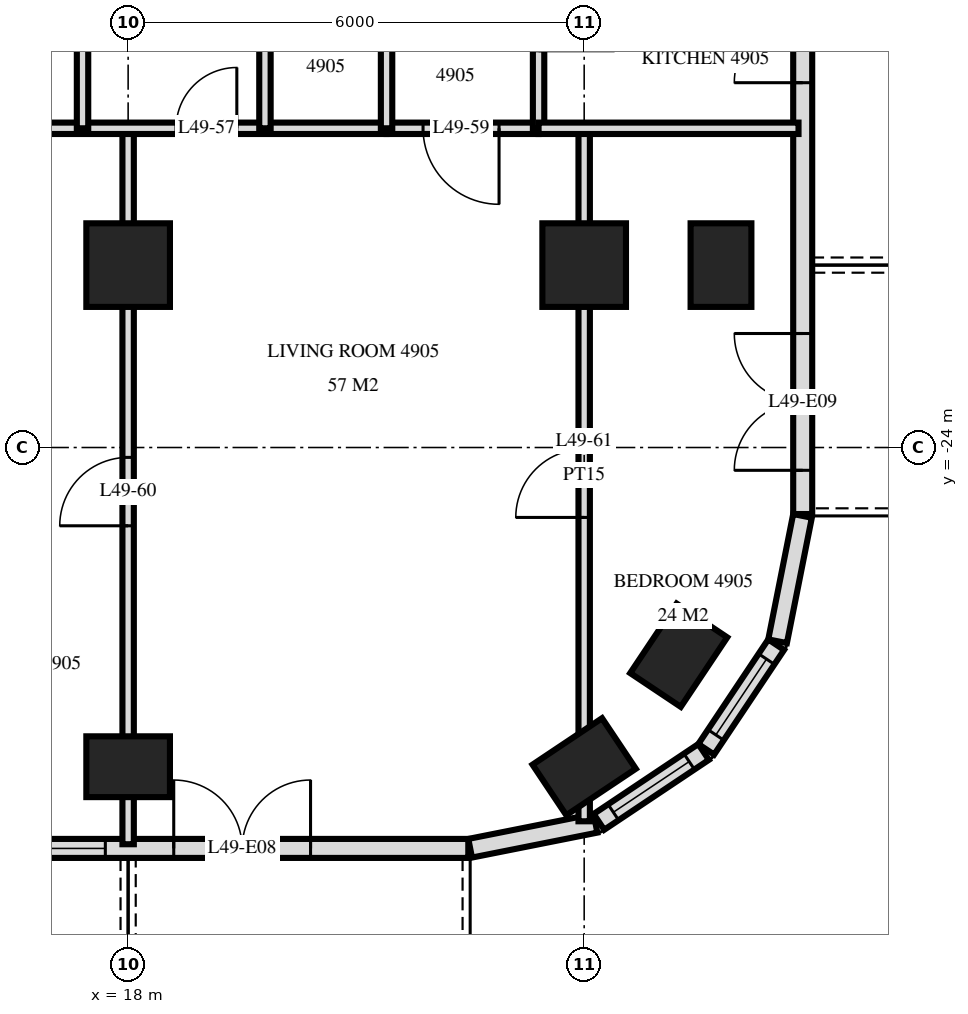
"""IFC4 building model, lengths in metres.
Left out: names, types, materials, properties, quantities, classifications, styles, units other than length and angle.
Written with IfcOpenShell. Run it as: python <this file> out.ifc"""

import sys

from ifc_helpers import new_model, si_unit, direction, frame, frame_2d, origin, origin_2d, place, context, subcontext, project, spatial, rectangle, extrude, element, fill, save


model = new_model("IFC4")
c1 = context("Model", 3, precision=1e-05, world=origin(), true_north=direction((0.0, 1.0)))
c2 = subcontext(c1, "Body", "Model", "MODEL_VIEW")
j1 = project(units=[si_unit("LENGTHUNIT", "METRE"), si_unit("PLANEANGLEUNIT", "RADIAN")], contexts=[c1])
p1 = place(None, origin())
s1 = spatial("IfcSite", under=j1, at=p1, CompositionType="ELEMENT")
p2 = place(p1, origin())
s2 = spatial("IfcBuilding", under=s1, at=p2, CompositionType="ELEMENT")
p3 = place(p2, frame((0.0, 0.0, 190.6)))
s3 = spatial("IfcBuildingStorey", under=s2, at=p3, CompositionType="ELEMENT", Elevation=190.6)
p4 = place(p3, frame((18.0, -28.2, 0.0), z_axis=(0.0, 0.0, 1.0), x_axis=(1.0, 0.0, 0.0)))
e1 = element("IfcColumn", 1, at=p4, inside=s3, PredefinedType="COLUMN", context=c2, shape_type="SweptSolid", body=[
    extrude(rectangle(XDim=1.1, YDim=0.8, at=origin_2d()), origin(), (0.0, 0.0, 1.0), 3.5),
])
p5 = place(p3, frame((18.0, -21.6, 0.0), z_axis=(0.0, 0.0, 1.0), x_axis=(1.0, 0.0, 0.0)))
e2 = element("IfcColumn", 2, at=p5, inside=s3, PredefinedType="COLUMN", context=c2, shape_type="SweptSolid", body=[
    extrude(rectangle(XDim=1.1, YDim=1.1, at=origin_2d()), origin(), (0.0, 0.0, 1.0), 3.5),
])
p6 = place(p3, frame((24.0, -28.2, 0.0), z_axis=(0.0, 0.0, 1.0), x_axis=(0.831459915646, 0.555584744817, 0.0)))
e3 = element("IfcColumn", 3, at=p6, inside=s3, PredefinedType="COLUMN", context=c2, shape_type="SweptSolid", body=[
    extrude(rectangle(XDim=1.1, YDim=0.8, at=origin_2d()), origin(), (0.0, 0.0, 1.0), 3.5),
])
p7 = place(p3, frame((24.0, -21.6, 0.0), z_axis=(0.0, 0.0, 1.0), x_axis=(1.0, 0.0, 0.0)))
e4 = element("IfcColumn", 4, at=p7, inside=s3, PredefinedType="COLUMN", context=c2, shape_type="SweptSolid", body=[
    extrude(rectangle(XDim=1.1, YDim=1.1, at=origin_2d()), origin(), (0.0, 0.0, 1.0), 3.5),
])
for number, where, z_axis, x_axis in (
    (5, (25.244, -26.733, 0.0), (0.0, 0.0, 1.0), (0.556, 0.831, 0.0)),
    (6, (25.8, -21.6, 0.0), (0.0, 0.0, 1.0), (0.0, 1.0, 0.0)),
):
    element("IfcColumn", number, at=place(p3, frame(where, z_axis=z_axis, x_axis=x_axis)), inside=s3, PredefinedType="COLUMN", context=c2, shape_type="SweptSolid", body=[
        extrude(rectangle(XDim=1.1, YDim=0.8, at=origin_2d()), origin(), (0.0, 0.0, 1.0), 3.5),
    ])
p8 = place(p3, frame((-22.475, -29.275, 0.0), z_axis=(0.0, 0.0, 1.0), x_axis=(1.0, 0.0, 0.0)))
e7 = element("IfcWall", 7, at=p8, inside=s3, PredefinedType="SOLIDWALL", context=c2, shape_type="SweptSolid", body=[
    extrude(rectangle(XDim=44.951, YDim=0.25, at=frame_2d((22.475, 0.0))), origin(), (0.0, 0.0, 1.0), 3.22),
])
p9 = place(p8, frame((0.575, 0.0, 0.0)))
e8 = element("IfcOpeningElement", 8, at=p9, cuts=e7, PredefinedType="OPENING", context=c2, shape_type="SweptSolid", body=[
    extrude(rectangle(XDim=1.8, YDim=2.4, at=frame_2d((0.9, 1.2))), frame((0.0, 0.135, 0.0), z_axis=(0.0, -1.0, 0.0), x_axis=(1.0, 0.0, 0.0)), (0.0, 0.0, 1.0), 0.27),
])
p10 = place(p8, frame((4.775, 0.0, 0.9)))
e9 = element("IfcOpeningElement", 9, at=p10, cuts=e7, PredefinedType="OPENING", context=c2, shape_type="SweptSolid", body=[
    extrude(rectangle(XDim=2.4, YDim=1.5, at=frame_2d((1.2, 0.75))), frame((0.0, 0.135, 0.0), z_axis=(0.0, -1.0, 0.0), x_axis=(1.0, 0.0, 0.0)), (0.0, 0.0, 1.0), 0.27),
])
p11 = place(p8, frame((8.075, 0.0, 0.0)))
e10 = element("IfcOpeningElement", 10, at=p11, cuts=e7, PredefinedType="OPENING", context=c2, shape_type="SweptSolid", body=[
    extrude(rectangle(XDim=1.8, YDim=2.4, at=frame_2d((0.9, 1.2))), frame((0.0, 0.135, 0.0), z_axis=(0.0, -1.0, 0.0), x_axis=(1.0, 0.0, 0.0)), (0.0, 0.0, 1.0), 0.27),
])
p12 = place(p8, frame((11.075, 0.0, 0.0)))
e11 = element("IfcOpeningElement", 11, at=p12, cuts=e7, PredefinedType="OPENING", context=c2, shape_type="SweptSolid", body=[
    extrude(rectangle(XDim=1.8, YDim=2.4, at=frame_2d((0.9, 1.2))), frame((0.0, 0.135, 0.0), z_axis=(0.0, -1.0, 0.0), x_axis=(1.0, 0.0, 0.0)), (0.0, 0.0, 1.0), 0.27),
])
p13 = place(p8, frame((13.775, 0.0, 0.9)))
e12 = element("IfcOpeningElement", 12, at=p13, cuts=e7, PredefinedType="OPENING", context=c2, shape_type="SweptSolid", body=[
    extrude(rectangle(XDim=2.4, YDim=1.5, at=frame_2d((1.2, 0.75))), frame((0.0, 0.135, 0.0), z_axis=(0.0, -1.0, 0.0), x_axis=(1.0, 0.0, 0.0)), (0.0, 0.0, 1.0), 0.27),
])
p14 = place(p8, frame((20.075, 0.0, 0.0)))
e13 = element("IfcOpeningElement", 13, at=p14, cuts=e7, PredefinedType="OPENING", context=c2, shape_type="SweptSolid", body=[
    extrude(rectangle(XDim=1.8, YDim=2.4, at=frame_2d((0.9, 1.2))), frame((0.0, 0.135, 0.0), z_axis=(0.0, -1.0, 0.0), x_axis=(1.0, 0.0, 0.0)), (0.0, 0.0, 1.0), 0.27),
])
p15 = place(p8, frame((23.075, 0.0, 0.0)))
e14 = element("IfcOpeningElement", 14, at=p15, cuts=e7, PredefinedType="OPENING", context=c2, shape_type="SweptSolid", body=[
    extrude(rectangle(XDim=1.8, YDim=2.4, at=frame_2d((0.9, 1.2))), frame((0.0, 0.135, 0.0), z_axis=(0.0, -1.0, 0.0), x_axis=(1.0, 0.0, 0.0)), (0.0, 0.0, 1.0), 0.27),
])
p16 = place(p8, frame((29.075, 0.0, 0.0)))
e15 = element("IfcOpeningElement", 15, at=p16, cuts=e7, PredefinedType="OPENING", context=c2, shape_type="SweptSolid", body=[
    extrude(rectangle(XDim=1.8, YDim=2.4, at=frame_2d((0.9, 1.2))), frame((0.0, 0.135, 0.0), z_axis=(0.0, -1.0, 0.0), x_axis=(1.0, 0.0, 0.0)), (0.0, 0.0, 1.0), 0.27),
])
p17 = place(p8, frame((31.775, 0.0, 0.9)))
e16 = element("IfcOpeningElement", 16, at=p17, cuts=e7, PredefinedType="OPENING", context=c2, shape_type="SweptSolid", body=[
    extrude(rectangle(XDim=2.4, YDim=1.5, at=frame_2d((1.2, 0.75))), frame((0.0, 0.135, 0.0), z_axis=(0.0, -1.0, 0.0), x_axis=(1.0, 0.0, 0.0)), (0.0, 0.0, 1.0), 0.27),
])
p18 = place(p8, frame((35.075, 0.0, 0.0)))
e17 = element("IfcOpeningElement", 17, at=p18, cuts=e7, PredefinedType="OPENING", context=c2, shape_type="SweptSolid", body=[
    extrude(rectangle(XDim=1.8, YDim=2.4, at=frame_2d((0.9, 1.2))), frame((0.0, 0.135, 0.0), z_axis=(0.0, -1.0, 0.0), x_axis=(1.0, 0.0, 0.0)), (0.0, 0.0, 1.0), 0.27),
])
p19 = place(p8, frame((37.775, 0.0, 0.9)))
e18 = element("IfcOpeningElement", 18, at=p19, cuts=e7, PredefinedType="OPENING", context=c2, shape_type="SweptSolid", body=[
    extrude(rectangle(XDim=2.4, YDim=1.5, at=frame_2d((1.2, 0.75))), frame((0.0, 0.135, 0.0), z_axis=(0.0, -1.0, 0.0), x_axis=(1.0, 0.0, 0.0)), (0.0, 0.0, 1.0), 0.27),
])
p20 = place(p8, frame((41.075, 0.0, 0.0)))
e19 = element("IfcOpeningElement", 19, at=p20, cuts=e7, PredefinedType="OPENING", context=c2, shape_type="SweptSolid", body=[
    extrude(rectangle(XDim=1.8, YDim=2.4, at=frame_2d((0.9, 1.2))), frame((0.0, 0.135, 0.0), z_axis=(0.0, -1.0, 0.0), x_axis=(1.0, 0.0, 0.0)), (0.0, 0.0, 1.0), 0.27),
])
p21 = place(p3, frame((22.5, -29.273, 0.0), z_axis=(0.0, 0.0, 1.0), x_axis=(0.980775640221, 0.19513878023, 0.0)))
e20 = element("IfcWall", 20, at=p21, inside=s3, PredefinedType="SOLIDWALL", context=c2, shape_type="SweptSolid", body=[
    extrude(rectangle(XDim=1.681, YDim=0.25, at=frame_2d((0.841, 0.0))), origin(), (0.0, 0.0, 1.0), 3.22),
])
p22 = place(p3, frame((24.194, -28.926, 0.0), z_axis=(0.0, 0.0, 1.0), x_axis=(0.831482937015, 0.55555029066, 0.0)))
e21 = element("IfcWall", 21, at=p22, inside=s3, PredefinedType="SOLIDWALL", context=c2, shape_type="SweptSolid", body=[
    extrude(rectangle(XDim=1.656, YDim=0.25, at=frame_2d((0.828, 0.0))), origin(), (0.0, 0.0, 1.0), 3.22),
])
p23 = place(p22, frame((0.228, 0.0, 0.9)))
e22 = element("IfcOpeningElement", 22, at=p23, cuts=e21, PredefinedType="OPENING", context=c2, shape_type="SweptSolid", body=[
    extrude(rectangle(XDim=1.2, YDim=1.5, at=frame_2d((0.6, 0.75))), frame((0.0, 0.135, 0.0), z_axis=(0.0, -1.0, 0.0), x_axis=(1.0, 0.0, 0.0)), (0.0, 0.0, 1.0), 0.27),
])
p24 = place(p3, frame((25.606, -27.971, 0.0), z_axis=(0.0, 0.0, 1.0), x_axis=(0.55555029066, 0.831482937015, 0.0)))
e23 = element("IfcWall", 23, at=p24, inside=s3, PredefinedType="SOLIDWALL", context=c2, shape_type="SweptSolid", body=[
    extrude(rectangle(XDim=1.656, YDim=0.25, at=frame_2d((0.828, 0.0))), origin(), (0.0, 0.0, 1.0), 3.22),
])
p25 = place(p24, frame((0.228, 0.0, 0.9)))
e24 = element("IfcOpeningElement", 24, at=p25, cuts=e23, PredefinedType="OPENING", context=c2, shape_type="SweptSolid", body=[
    extrude(rectangle(XDim=1.2, YDim=1.5, at=frame_2d((0.6, 0.75))), frame((0.0, 0.135, 0.0), z_axis=(0.0, -1.0, 0.0), x_axis=(1.0, 0.0, 0.0)), (0.0, 0.0, 1.0), 0.27),
])
p26 = place(p3, frame((26.545, -26.549, 0.0), z_axis=(0.0, 0.0, 1.0), x_axis=(0.195026884138, 0.980797896849, 0.0)))
e25 = element("IfcWall", 25, at=p26, inside=s3, PredefinedType="SOLIDWALL", context=c2, shape_type="SweptSolid", body=[
    extrude(rectangle(XDim=1.681, YDim=0.25, at=frame_2d((0.841, 0.0))), origin(), (0.0, 0.0, 1.0), 3.22),
])
p27 = place(p3, frame((26.875, -24.875, 0.0), z_axis=(0.0, 0.0, 1.0), x_axis=(0.0, 1.0, 0.0)))
e26 = element("IfcWall", 26, at=p27, inside=s3, PredefinedType="SOLIDWALL", context=c2, shape_type="SweptSolid", body=[
    extrude(rectangle(XDim=21.551, YDim=0.25, at=frame_2d((10.775, 0.0))), origin(), (0.0, 0.0, 1.0), 3.22),
])
p28 = place(p27, frame((0.575, 0.0, 0.0)))
e27 = element("IfcOpeningElement", 27, at=p28, cuts=e26, PredefinedType="OPENING", context=c2, shape_type="SweptSolid", body=[
    extrude(rectangle(XDim=1.8, YDim=2.4, at=frame_2d((0.9, 1.2))), frame((0.0, 0.135, 0.0), z_axis=(0.0, -1.0, 0.0), x_axis=(1.0, 0.0, 0.0)), (0.0, 0.0, 1.0), 0.27),
])
p29 = place(p27, frame((5.675, 0.0, 0.0)))
e28 = element("IfcOpeningElement", 28, at=p29, cuts=e26, PredefinedType="OPENING", context=c2, shape_type="SweptSolid", body=[
    extrude(rectangle(XDim=1.8, YDim=2.4, at=frame_2d((0.9, 1.2))), frame((0.0, 0.135, 0.0), z_axis=(0.0, -1.0, 0.0), x_axis=(1.0, 0.0, 0.0)), (0.0, 0.0, 1.0), 0.27),
])
p30 = place(p27, frame((10.175, 0.0, 0.9)))
e29 = element("IfcOpeningElement", 29, at=p30, cuts=e26, PredefinedType="OPENING", context=c2, shape_type="SweptSolid", body=[
    extrude(rectangle(XDim=2.4, YDim=1.5, at=frame_2d((1.2, 0.75))), frame((0.0, 0.135, 0.0), z_axis=(0.0, -1.0, 0.0), x_axis=(1.0, 0.0, 0.0)), (0.0, 0.0, 1.0), 0.27),
])
p31 = place(p27, frame((13.475, 0.0, 0.0)))
e30 = element("IfcOpeningElement", 30, at=p31, cuts=e26, PredefinedType="OPENING", context=c2, shape_type="SweptSolid", body=[
    extrude(rectangle(XDim=1.8, YDim=2.4, at=frame_2d((0.9, 1.2))), frame((0.0, 0.135, 0.0), z_axis=(0.0, -1.0, 0.0), x_axis=(1.0, 0.0, 0.0)), (0.0, 0.0, 1.0), 0.27),
])
p32 = place(p3, frame((24.0, -28.918, 0.0), z_axis=(0.0, 0.0, 1.0), x_axis=(0.0, 1.0, 0.0)))
e31 = element("IfcWall", 31, at=p32, inside=s3, PredefinedType="PARTITIONING", context=c2, shape_type="SweptSolid", body=[
    extrude(rectangle(XDim=9.118, YDim=0.15, at=frame_2d((4.559, 0.0))), origin(), (0.0, 0.0, 1.0), 3.22),
])
p33 = place(p32, frame((3.998, 0.0, 0.0)))
e32 = element("IfcOpeningElement", 32, at=p33, cuts=e31, PredefinedType="OPENING", context=c2, shape_type="SweptSolid", body=[
    extrude(rectangle(XDim=0.9, YDim=2.1, at=frame_2d((0.45, 1.05))), frame((0.0, 0.085, 0.0), z_axis=(0.0, -1.0, 0.0), x_axis=(1.0, 0.0, 0.0)), (0.0, 0.0, 1.0), 0.17),
])
p34 = place(p3, frame((23.4, -19.8, 0.0), z_axis=(0.0, 0.0, 1.0), x_axis=(0.0, 1.0, 0.0)))
e33 = element("IfcWall", 33, at=p34, inside=s3, PredefinedType="PARTITIONING", context=c2, shape_type="SweptSolid", body=[
    extrude(rectangle(XDim=3.0, YDim=0.15, at=frame_2d((1.5, 0.0))), origin(), (0.0, 0.0, 1.0), 3.22),
])
p35 = place(p34, frame((1.02, 0.0, 0.0)))
e34 = element("IfcOpeningElement", 34, at=p35, cuts=e33, PredefinedType="OPENING", context=c2, shape_type="SweptSolid", body=[
    extrude(rectangle(XDim=1.0, YDim=2.1, at=frame_2d((0.5, 1.05))), frame((0.0, 0.085, 0.0), z_axis=(0.0, -1.0, 0.0), x_axis=(1.0, 0.0, 0.0)), (0.0, 0.0, 1.0), 0.17),
])
for number, where, z_axis, x_axis in (
    (35, (21.4, -19.8, 0.0), (0.0, 0.0, 1.0), (0.0, 1.0, 0.0)),
    (36, (19.8, -19.8, 0.0), (0.0, 0.0, 1.0), (0.0, 1.0, 0.0)),
):
    element("IfcWall", number, at=place(p3, frame(where, z_axis=z_axis, x_axis=x_axis)), inside=s3, PredefinedType="PARTITIONING", context=c2, shape_type="SweptSolid", body=[
        extrude(rectangle(XDim=3.0, YDim=0.15, at=frame_2d((1.5, 0.0))), origin(), (0.0, 0.0, 1.0), 3.22),
    ])
p36 = place(p3, frame((18.0, -29.22, 0.0), z_axis=(0.0, 0.0, 1.0), x_axis=(0.0, 1.0, 0.0)))
e37 = element("IfcWall", 37, at=p36, inside=s3, PredefinedType="PARTITIONING", context=c2, shape_type="SweptSolid", body=[
    extrude(rectangle(XDim=9.42, YDim=0.15, at=frame_2d((4.71, 0.0))), origin(), (0.0, 0.0, 1.0), 3.22),
])
p37 = place(p36, frame((4.19, 0.0, 0.0)))
e38 = element("IfcOpeningElement", 38, at=p37, cuts=e37, PredefinedType="OPENING", context=c2, shape_type="SweptSolid", body=[
    extrude(rectangle(XDim=0.9, YDim=2.1, at=frame_2d((0.45, 1.05))), frame((0.0, 0.085, 0.0), z_axis=(0.0, -1.0, 0.0), x_axis=(1.0, 0.0, 0.0)), (0.0, 0.0, 1.0), 0.17),
])
p38 = place(p3, frame((17.4, -19.8, 0.0), z_axis=(0.0, 0.0, 1.0), x_axis=(0.0, 1.0, 0.0)))
e39 = element("IfcWall", 39, at=p38, inside=s3, PredefinedType="PARTITIONING", context=c2, shape_type="SweptSolid", body=[
    extrude(rectangle(XDim=3.0, YDim=0.15, at=frame_2d((1.5, 0.0))), origin(), (0.0, 0.0, 1.0), 3.22),
])
p39 = place(p3, frame((21.4, -19.8, 0.0), z_axis=(0.0, 0.0, 1.0), x_axis=(1.0, 0.0, 0.0)))
e40 = element("IfcWall", 40, at=p39, inside=s3, PredefinedType="PARTITIONING", context=c2, shape_type="SweptSolid", body=[
    extrude(rectangle(XDim=2.0, YDim=0.15, at=frame_2d((1.0, 0.0))), origin(), (0.0, 0.0, 1.0), 3.22),
])
p40 = place(p39, frame((0.48, 0.0, 0.0)))
e41 = element("IfcOpeningElement", 41, at=p40, cuts=e40, PredefinedType="OPENING", context=c2, shape_type="SweptSolid", body=[
    extrude(rectangle(XDim=1.0, YDim=2.1, at=frame_2d((0.5, 1.05))), frame((0.0, 0.085, 0.0), z_axis=(0.0, -1.0, 0.0), x_axis=(1.0, 0.0, 0.0)), (0.0, 0.0, 1.0), 0.17),
])
p41 = place(p3, frame((13.3, -19.8, 0.0), z_axis=(0.0, 0.0, 1.0), x_axis=(1.0, 0.0, 0.0)))
e42 = element("IfcWall", 42, at=p41, inside=s3, PredefinedType="PARTITIONING", context=c2, shape_type="SweptSolid", body=[
    extrude(rectangle(XDim=8.1, YDim=0.15, at=frame_2d((4.05, 0.0))), origin(), (0.0, 0.0, 1.0), 3.22),
])
p42 = place(p41, frame((2.48, 0.0, 0.0)))
e43 = element("IfcOpeningElement", 43, at=p42, cuts=e42, PredefinedType="OPENING", context=c2, shape_type="SweptSolid", body=[
    extrude(rectangle(XDim=0.8, YDim=2.1, at=frame_2d((0.4, 1.05))), frame((0.0, 0.085, 0.0), z_axis=(0.0, -1.0, 0.0), x_axis=(1.0, 0.0, 0.0)), (0.0, 0.0, 1.0), 0.17),
])
p43 = place(p41, frame((5.33, 0.0, 0.0)))
e44 = element("IfcOpeningElement", 44, at=p43, cuts=e42, PredefinedType="OPENING", context=c2, shape_type="SweptSolid", body=[
    extrude(rectangle(XDim=0.8, YDim=2.1, at=frame_2d((0.4, 1.05))), frame((0.0, 0.085, 0.0), z_axis=(0.0, -1.0, 0.0), x_axis=(1.0, 0.0, 0.0)), (0.0, 0.0, 1.0), 0.17),
])
p44 = place(p3, frame((23.4, -19.8, 0.0), z_axis=(0.0, 0.0, 1.0), x_axis=(1.0, 0.0, 0.0)))
e45 = element("IfcWall", 45, at=p44, inside=s3, PredefinedType="PARTITIONING", context=c2, shape_type="SweptSolid", body=[
    extrude(rectangle(XDim=3.42, YDim=0.15, at=frame_2d((1.71, 0.0))), origin(), (0.0, 0.0, 1.0), 3.22),
])
p45 = place(p23, origin())
e46 = element("IfcWindow", 46, at=p45, inside=s3, PartitioningType="SINGLE_PANEL", PredefinedType="WINDOW", context=c2, shape_type="SweptSolid", body=[
    extrude(rectangle(XDim=1.2, YDim=1.5, at=frame_2d((0.6, 0.75))), frame((0.0, 0.03, 0.0), z_axis=(0.0, -1.0, 0.0), x_axis=(1.0, 0.0, 0.0)), (0.0, 0.0, 1.0), 0.06),
])
fill(e22, e46)
p46 = place(p25, origin())
e47 = element("IfcWindow", 47, at=p46, inside=s3, PartitioningType="SINGLE_PANEL", PredefinedType="WINDOW", context=c2, shape_type="SweptSolid", body=[
    extrude(rectangle(XDim=1.2, YDim=1.5, at=frame_2d((0.6, 0.75))), frame((0.0, 0.03, 0.0), z_axis=(0.0, -1.0, 0.0), x_axis=(1.0, 0.0, 0.0)), (0.0, 0.0, 1.0), 0.06),
])
fill(e24, e47)
p47 = place(p19, origin())
e48 = element("IfcWindow", 48, at=p47, inside=s3, PartitioningType="SINGLE_PANEL", PredefinedType="WINDOW", context=c2, shape_type="SweptSolid", body=[
    extrude(rectangle(XDim=2.4, YDim=1.5, at=frame_2d((1.2, 0.75))), frame((0.0, 0.03, 0.0), z_axis=(0.0, -1.0, 0.0), x_axis=(1.0, 0.0, 0.0)), (0.0, 0.0, 1.0), 0.06),
])
fill(e18, e48)
p48 = place(p20, origin())
e49 = element("IfcDoor", 49, at=p48, inside=s3, OperationType="DOUBLE_DOOR_SINGLE_SWING", PredefinedType="DOOR", context=c2, shape_type="SweptSolid", body=[
    extrude(rectangle(XDim=1.8, YDim=2.4, at=frame_2d((0.9, 1.2))), frame((0.0, 0.025, 0.0), z_axis=(0.0, -1.0, 0.0), x_axis=(1.0, 0.0, 0.0)), (0.0, 0.0, 1.0), 0.05),
])
fill(e19, e49)
p49 = place(p28, origin())
e50 = element("IfcDoor", 50, at=p49, inside=s3, OperationType="DOUBLE_DOOR_SINGLE_SWING", PredefinedType="DOOR", context=c2, shape_type="SweptSolid", body=[
    extrude(rectangle(XDim=1.8, YDim=2.4, at=frame_2d((0.9, 1.2))), frame((0.0, 0.025, 0.0), z_axis=(0.0, -1.0, 0.0), x_axis=(1.0, 0.0, 0.0)), (0.0, 0.0, 1.0), 0.05),
])
fill(e27, e50)
p50 = place(p29, origin())
e51 = element("IfcDoor", 51, at=p50, inside=s3, OperationType="DOUBLE_DOOR_SINGLE_SWING", PredefinedType="DOOR", context=c2, shape_type="SweptSolid", body=[
    extrude(rectangle(XDim=1.8, YDim=2.4, at=frame_2d((0.9, 1.2))), frame((0.0, 0.025, 0.0), z_axis=(0.0, -1.0, 0.0), x_axis=(1.0, 0.0, 0.0)), (0.0, 0.0, 1.0), 0.05),
])
fill(e28, e51)
p51 = place(p43, origin())
e52 = element("IfcDoor", 52, at=p51, inside=s3, OperationType="SINGLE_SWING_LEFT", PredefinedType="DOOR", context=c2, shape_type="SweptSolid", body=[
    extrude(rectangle(XDim=0.8, YDim=2.1, at=frame_2d((0.4, 1.05))), frame((0.0, 0.025, 0.0), z_axis=(0.0, -1.0, 0.0), x_axis=(1.0, 0.0, 0.0)), (0.0, 0.0, 1.0), 0.05),
])
fill(e44, e52)
p52 = place(p40, frame((0.5, 0.0, 0.0), z_axis=(0.0, 0.0, 1.0), x_axis=(-1.0, 0.0, 0.0)))
e53 = element("IfcDoor", 53, at=p52, inside=s3, OperationType="SINGLE_SWING_RIGHT", PredefinedType="DOOR", context=c2, shape_type="SweptSolid", body=[
    extrude(rectangle(XDim=1.0, YDim=2.1, at=frame_2d((0.0, 1.05))), frame((0.0, -0.025, 0.0), z_axis=(0.0, 1.0, 0.0), x_axis=(-1.0, 0.0, 0.0)), (0.0, 0.0, 1.0), 0.05),
])
fill(e41, e53)
p53 = place(p37, origin())
e54 = element("IfcDoor", 54, at=p53, inside=s3, OperationType="SINGLE_SWING_RIGHT", PredefinedType="DOOR", context=c2, shape_type="SweptSolid", body=[
    extrude(rectangle(XDim=0.9, YDim=2.1, at=frame_2d((0.45, 1.05))), frame((0.0, 0.025, 0.0), z_axis=(0.0, -1.0, 0.0), x_axis=(1.0, 0.0, 0.0)), (0.0, 0.0, 1.0), 0.05),
])
fill(e38, e54)
p54 = place(p33, origin())
e55 = element("IfcDoor", 55, at=p54, inside=s3, OperationType="SINGLE_SWING_RIGHT", PredefinedType="DOOR", context=c2, shape_type="SweptSolid", body=[
    extrude(rectangle(XDim=0.9, YDim=2.1, at=frame_2d((0.45, 1.05))), frame((0.0, 0.025, 0.0), z_axis=(0.0, -1.0, 0.0), x_axis=(1.0, 0.0, 0.0)), (0.0, 0.0, 1.0), 0.05),
])
fill(e32, e55)
save(model, sys.argv[1])
